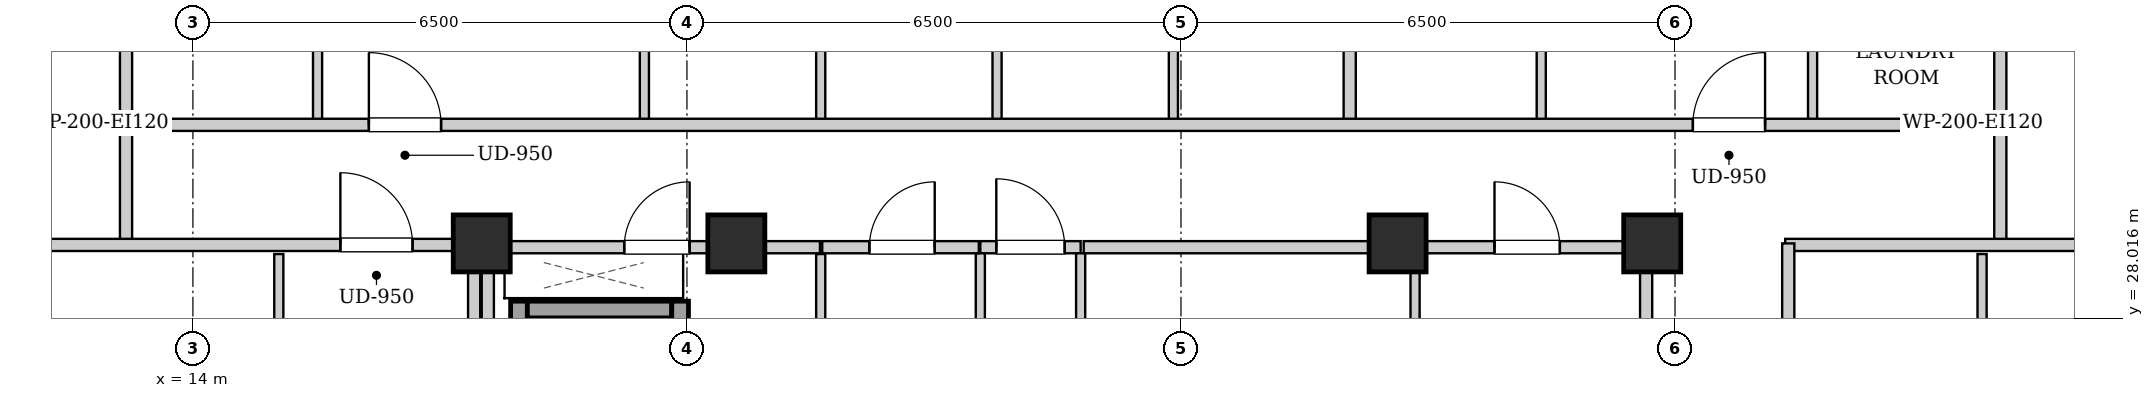
"""IFC4 building model, lengths in metres.
Left out: names, types, materials, properties, quantities, classifications, styles, units other than length and angle.
Written with IfcOpenShell. Run it as: python <this file> out.ifc"""

import sys

from ifc_helpers import new_model, si_unit, direction, frame, frame_2d, origin, origin_2d, place, context, subcontext, project, spatial, rectangle, extrude, element, fill, save


model = new_model("IFC4")
c1 = context("Model", 3, precision=1e-05, world=origin(), true_north=direction((0.0, 1.0)))
c2 = subcontext(c1, "Body", "Model", "MODEL_VIEW")
j1 = project(units=[si_unit("LENGTHUNIT", "METRE"), si_unit("PLANEANGLEUNIT", "RADIAN")], contexts=[c1])
p1 = place(None, origin())
s1 = spatial("IfcSite", under=j1, at=p1, CompositionType="ELEMENT")
p2 = place(p1, origin())
s2 = spatial("IfcBuilding", under=s1, at=p2, CompositionType="ELEMENT")
p3 = place(p2, frame((0.0, 0.0, 247.9)))
s3 = spatial("IfcBuildingStorey", under=s2, at=p3, CompositionType="ELEMENT", Elevation=247.9)
for number, where, z_axis, x_axis in (
    (1, (17.8, 29.0, 0.0), (0.0, 0.0, 1.0), (1.0, 0.0, 0.0)),
    (2, (21.15, 29.0, 0.0), (0.0, 0.0, 1.0), (1.0, 0.0, 0.0)),
    (3, (29.85, 29.0, 0.0), (0.0, 0.0, 1.0), (1.0, 0.0, 0.0)),
    (4, (33.2, 29.0, 0.0), (0.0, 0.0, 1.0), (1.0, 0.0, 0.0)),
):
    element("IfcColumn", number, at=place(p3, frame(where, z_axis=z_axis, x_axis=x_axis)), inside=s3, PredefinedType="COLUMN", context=c2, shape_type="SweptSolid", body=[
        extrude(rectangle(XDim=0.75, YDim=0.75, at=origin_2d()), origin(), (0.0, 0.0, 1.0), 3.4),
    ])
p4 = place(p3, frame((18.29, 24.1, 0.0), z_axis=(0.0, 0.0, 1.0), x_axis=(0.0, 1.0, 0.0)))
e5 = element("IfcWall", 5, at=p4, inside=s3, PredefinedType="SHEAR", context=c2, shape_type="SweptSolid", body=[
    extrude(rectangle(XDim=4.14, YDim=0.22, at=frame_2d((2.07, 0.0))), origin(), (0.0, 0.0, 1.0), 3.14),
])
p5 = place(p3, frame((18.4, 28.13, 0.0), z_axis=(0.0, 0.0, 1.0), x_axis=(1.0, 0.0, 0.0)))
e6 = element("IfcWall", 6, at=p5, inside=s3, PredefinedType="SHEAR", context=c2, shape_type="SweptSolid", body=[
    extrude(rectangle(XDim=1.9, YDim=0.22, at=frame_2d((0.95, 0.0))), origin(), (0.0, 0.0, 1.0), 3.14),
])
p6 = place(p3, frame((20.41, 26.06, 0.0), z_axis=(0.0, 0.0, 1.0), x_axis=(0.0, 1.0, 0.0)))
e7 = element("IfcWall", 7, at=p6, inside=s3, PredefinedType="SHEAR", context=c2, shape_type="SweptSolid", body=[
    extrude(rectangle(XDim=2.18, YDim=0.22, at=frame_2d((1.09, 0.0))), origin(), (0.0, 0.0, 1.0), 3.14),
])
p7 = place(p6, frame((0.54, 0.0, 0.0)))
e8 = element("IfcOpeningElement", 8, at=p7, cuts=e7, PredefinedType="OPENING", context=c2, shape_type="SweptSolid", body=[
    extrude(rectangle(XDim=1.1, YDim=2.15, at=frame_2d((0.55, 1.075))), frame((0.0, 0.12, 0.0), z_axis=(0.0, -1.0, 0.0), x_axis=(1.0, 0.0, 0.0)), (0.0, 0.0, 1.0), 0.24),
])
for number, where, z_axis, x_axis in (
    (9, (17.88, 24.12, 0.0), (0.0, 0.0, 1.0), (0.0, 1.0, 0.0)),
    (10, (33.12, 24.12, 0.0), (0.0, 0.0, 1.0), (0.0, 1.0, 0.0)),
):
    element("IfcWall", number, at=place(p3, frame(where, z_axis=z_axis, x_axis=x_axis)), inside=s3, PredefinedType="PARTITIONING", context=c2, shape_type="SweptSolid", body=[
        extrude(rectangle(XDim=4.76, YDim=0.16, at=frame_2d((2.38, 0.0))), origin(), (0.0, 0.0, 1.0), 2.475),
    ])
p8 = place(p3, frame((24.36, 28.95, 0.0), z_axis=(0.0, 0.0, 1.0), x_axis=(1.0, 0.0, 0.0)))
e11 = element("IfcWall", 11, at=p8, inside=s3, PredefinedType="PARTITIONING", context=c2, shape_type="SweptSolid", body=[
    extrude(rectangle(XDim=1.32, YDim=0.16, at=frame_2d((0.66, 0.0))), origin(), (0.0, 0.0, 1.0), 2.668),
])
p9 = place(p8, frame((0.21, 0.0, 0.0)))
e12 = element("IfcOpeningElement", 12, at=p9, cuts=e11, PredefinedType="OPENING", context=c2, shape_type="SweptSolid", body=[
    extrude(rectangle(XDim=0.9, YDim=2.05, at=frame_2d((0.45, 1.025))), frame((0.0, 0.09, 0.0), z_axis=(0.0, -1.0, 0.0), x_axis=(1.0, 0.0, 0.0)), (0.0, 0.0, 1.0), 0.18),
])
p10 = place(p3, frame((17.96, 28.95, 0.0), z_axis=(0.0, 0.0, 1.0), x_axis=(1.0, 0.0, 0.0)))
e13 = element("IfcWall", 13, at=p10, inside=s3, PredefinedType="PARTITIONING", context=c2, shape_type="SweptSolid", body=[
    extrude(rectangle(XDim=4.29, YDim=0.16, at=frame_2d((2.145, 0.0))), origin(), (0.0, 0.0, 1.0), 2.668),
])
p11 = place(p10, frame((1.715, 0.0, 0.0)))
e14 = element("IfcOpeningElement", 14, at=p11, cuts=e13, PredefinedType="OPENING", context=c2, shape_type="SweptSolid", body=[
    extrude(rectangle(XDim=0.86, YDim=2.05, at=frame_2d((0.43, 1.025))), frame((0.0, 0.09, 0.0), z_axis=(0.0, -1.0, 0.0), x_axis=(1.0, 0.0, 0.0)), (0.0, 0.0, 1.0), 0.18),
])
for number, where, z_axis, x_axis in (
    (15, (24.36, 25.0, 0.0), (0.0, 0.0, 1.0), (0.0, 1.0, 0.0)),
    (16, (25.68, 25.0, 0.0), (0.0, 0.0, 1.0), (0.0, 1.0, 0.0)),
):
    element("IfcWall", number, at=place(p3, frame(where, z_axis=z_axis, x_axis=x_axis)), inside=s3, PredefinedType="PARTITIONING", context=c2, shape_type="SweptSolid", body=[
        extrude(rectangle(XDim=3.87, YDim=0.12, at=frame_2d((1.935, 0.0))), origin(), (0.0, 0.0, 1.0), 3.14),
    ])
p12 = place(p3, frame((30.08, 26.18, 0.0), z_axis=(0.0, 0.0, 1.0), x_axis=(0.0, 1.0, 0.0)))
e17 = element("IfcWall", 17, at=p12, inside=s3, PredefinedType="PARTITIONING", context=c2, shape_type="SweptSolid", body=[
    extrude(rectangle(XDim=2.68, YDim=0.12, at=frame_2d((1.34, 0.0))), origin(), (0.0, 0.0, 1.0), 3.14),
])
p13 = place(p3, frame((30.08, 28.95, 0.0), z_axis=(0.0, 0.0, 1.0), x_axis=(1.0, 0.0, 0.0)))
e18 = element("IfcWall", 18, at=p13, inside=s3, PredefinedType="PARTITIONING", context=c2, shape_type="SweptSolid", body=[
    extrude(rectangle(XDim=2.96, YDim=0.16, at=frame_2d((1.48, 0.0))), origin(), (0.0, 0.0, 1.0), 3.14),
])
p14 = place(p13, frame((1.045, 0.0, 0.0)))
e19 = element("IfcOpeningElement", 19, at=p14, cuts=e18, PredefinedType="OPENING", context=c2, shape_type="SweptSolid", body=[
    extrude(rectangle(XDim=0.86, YDim=2.05, at=frame_2d((0.43, 1.025))), frame((0.0, 0.09, 0.0), z_axis=(0.0, -1.0, 0.0), x_axis=(1.0, 0.0, 0.0)), (0.0, 0.0, 1.0), 0.18),
])
p15 = place(p3, frame((22.26, 25.0, 0.0), z_axis=(0.0, 0.0, 1.0), x_axis=(0.0, 1.0, 0.0)))
e20 = element("IfcWall", 20, at=p15, inside=s3, PredefinedType="PARTITIONING", context=c2, shape_type="SweptSolid", body=[
    extrude(rectangle(XDim=3.86, YDim=0.12, at=frame_2d((1.93, 0.0))), origin(), (0.0, 0.0, 1.0), 3.14),
])
p16 = place(p3, frame((22.28, 28.95, 0.0), z_axis=(0.0, 0.0, 1.0), x_axis=(1.0, 0.0, 0.0)))
e21 = element("IfcWall", 21, at=p16, inside=s3, PredefinedType="PARTITIONING", context=c2, shape_type="SweptSolid", body=[
    extrude(rectangle(XDim=2.06, YDim=0.16, at=frame_2d((1.03, 0.0))), origin(), (0.0, 0.0, 1.0), 2.668),
])
p17 = place(p16, frame((0.62, 0.0, 0.0)))
e22 = element("IfcOpeningElement", 22, at=p17, cuts=e21, PredefinedType="OPENING", context=c2, shape_type="SweptSolid", body=[
    extrude(rectangle(XDim=0.86, YDim=2.05, at=frame_2d((0.43, 1.025))), frame((0.0, 0.09, 0.0), z_axis=(0.0, -1.0, 0.0), x_axis=(1.0, 0.0, 0.0)), (0.0, 0.0, 1.0), 0.18),
])
p18 = place(p3, frame((25.72, 28.95, 0.0), z_axis=(0.0, 0.0, 1.0), x_axis=(1.0, 0.0, 0.0)))
e23 = element("IfcWall", 23, at=p18, inside=s3, PredefinedType="PARTITIONING", context=c2, shape_type="SweptSolid", body=[
    extrude(rectangle(XDim=4.32, YDim=0.16, at=frame_2d((2.16, 0.0))), origin(), (0.0, 0.0, 1.0), 2.668),
])
for number, where, z_axis, x_axis in (
    (24, (13.12, 28.98, 0.0), (0.0, 0.0, 1.0), (0.0, 1.0, 0.0)),
    (25, (37.78, 28.98, 0.0), (0.0, 0.0, 1.0), (0.0, 1.0, 0.0)),
):
    element("IfcWall", number, at=place(p3, frame(where, z_axis=z_axis, x_axis=x_axis)), inside=s3, PredefinedType="PARTITIONING", context=c2, shape_type="SweptSolid", body=[
        extrude(rectangle(XDim=1.58, YDim=0.16, at=frame_2d((0.79, 0.0))), origin(), (0.0, 0.0, 1.0), 3.14),
    ])
p19 = place(p3, frame((34.95, 28.98, 0.0), z_axis=(0.0, 0.0, 1.0), x_axis=(1.0, 0.0, 0.0)))
e26 = element("IfcWall", 26, at=p19, inside=s3, PredefinedType="PARTITIONING", context=c2, shape_type="SweptSolid", body=[
    extrude(rectangle(XDim=5.07, YDim=0.16, at=frame_2d((2.535, 0.0))), origin(), (0.0, 0.0, 1.0), 2.668),
])
p20 = place(p3, frame((13.12, 30.6, 0.0), z_axis=(0.0, 0.0, 1.0), x_axis=(0.0, 1.0, 0.0)))
e27 = element("IfcWall", 27, at=p20, inside=s3, PredefinedType="PARTITIONING", context=c2, shape_type="SweptSolid", body=[
    extrude(rectangle(XDim=2.91, YDim=0.16, at=frame_2d((1.455, 0.0))), origin(), (0.0, 0.0, 1.0), 3.14),
])
p21 = place(p3, frame((15.64, 30.6, 0.0), z_axis=(0.0, 0.0, 1.0), x_axis=(0.0, 1.0, 0.0)))
e28 = element("IfcWall", 28, at=p21, inside=s3, PredefinedType="PARTITIONING", context=c2, shape_type="SweptSolid", body=[
    extrude(rectangle(XDim=2.85, YDim=0.12, at=frame_2d((1.425, 0.0))), origin(), (0.0, 0.0, 1.0), 3.14),
])
p22 = place(p21, frame((0.995, 0.0, 0.0)))
e29 = element("IfcOpeningElement", 29, at=p22, cuts=e28, PredefinedType="OPENING", context=c2, shape_type="SweptSolid", body=[
    extrude(rectangle(XDim=0.86, YDim=2.05, at=frame_2d((0.43, 1.025))), frame((0.0, 0.07, 0.0), z_axis=(0.0, -1.0, 0.0), x_axis=(1.0, 0.0, 0.0)), (0.0, 0.0, 1.0), 0.14),
])
p23 = place(p3, frame((19.94, 30.6, 0.0), z_axis=(0.0, 0.0, 1.0), x_axis=(0.0, 1.0, 0.0)))
e30 = element("IfcWall", 30, at=p23, inside=s3, PredefinedType="PARTITIONING", context=c2, shape_type="SweptSolid", body=[
    extrude(rectangle(XDim=2.85, YDim=0.12, at=frame_2d((1.425, 0.0))), origin(), (0.0, 0.0, 1.0), 3.14),
])
p24 = place(p23, frame((0.975, 0.0, 0.0)))
e31 = element("IfcOpeningElement", 31, at=p24, cuts=e30, PredefinedType="OPENING", context=c2, shape_type="SweptSolid", body=[
    extrude(rectangle(XDim=0.9, YDim=2.05, at=frame_2d((0.45, 1.025))), frame((0.0, 0.07, 0.0), z_axis=(0.0, -1.0, 0.0), x_axis=(1.0, 0.0, 0.0)), (0.0, 0.0, 1.0), 0.14),
])
p25 = place(p3, frame((22.26, 30.6, 0.0), z_axis=(0.0, 0.0, 1.0), x_axis=(0.0, 1.0, 0.0)))
e32 = element("IfcWall", 32, at=p25, inside=s3, PredefinedType="PARTITIONING", context=c2, shape_type="SweptSolid", body=[
    extrude(rectangle(XDim=2.85, YDim=0.12, at=frame_2d((1.425, 0.0))), origin(), (0.0, 0.0, 1.0), 3.14),
])
p26 = place(p25, frame((0.975, 0.0, 0.0)))
e33 = element("IfcOpeningElement", 33, at=p26, cuts=e32, PredefinedType="OPENING", context=c2, shape_type="SweptSolid", body=[
    extrude(rectangle(XDim=0.9, YDim=2.05, at=frame_2d((0.45, 1.025))), frame((0.0, 0.07, 0.0), z_axis=(0.0, -1.0, 0.0), x_axis=(1.0, 0.0, 0.0)), (0.0, 0.0, 1.0), 0.14),
])
p27 = place(p3, frame((24.58, 30.6, 0.0), z_axis=(0.0, 0.0, 1.0), x_axis=(0.0, 1.0, 0.0)))
e34 = element("IfcWall", 34, at=p27, inside=s3, PredefinedType="PARTITIONING", context=c2, shape_type="SweptSolid", body=[
    extrude(rectangle(XDim=2.85, YDim=0.12, at=frame_2d((1.425, 0.0))), origin(), (0.0, 0.0, 1.0), 3.14),
])
p28 = place(p27, frame((0.975, 0.0, 0.0)))
e35 = element("IfcOpeningElement", 35, at=p28, cuts=e34, PredefinedType="OPENING", context=c2, shape_type="SweptSolid", body=[
    extrude(rectangle(XDim=0.9, YDim=2.05, at=frame_2d((0.45, 1.025))), frame((0.0, 0.07, 0.0), z_axis=(0.0, -1.0, 0.0), x_axis=(1.0, 0.0, 0.0)), (0.0, 0.0, 1.0), 0.14),
])
p29 = place(p3, frame((26.9, 30.6, 0.0), z_axis=(0.0, 0.0, 1.0), x_axis=(0.0, 1.0, 0.0)))
e36 = element("IfcWall", 36, at=p29, inside=s3, PredefinedType="PARTITIONING", context=c2, shape_type="SweptSolid", body=[
    extrude(rectangle(XDim=2.85, YDim=0.12, at=frame_2d((1.425, 0.0))), origin(), (0.0, 0.0, 1.0), 3.14),
])
p30 = place(p29, frame((0.975, 0.0, 0.0)))
e37 = element("IfcOpeningElement", 37, at=p30, cuts=e36, PredefinedType="OPENING", context=c2, shape_type="SweptSolid", body=[
    extrude(rectangle(XDim=0.9, YDim=2.05, at=frame_2d((0.45, 1.025))), frame((0.0, 0.07, 0.0), z_axis=(0.0, -1.0, 0.0), x_axis=(1.0, 0.0, 0.0)), (0.0, 0.0, 1.0), 0.14),
])
p31 = place(p3, frame((37.78, 30.6, 0.0), z_axis=(0.0, 0.0, 1.0), x_axis=(0.0, 1.0, 0.0)))
e38 = element("IfcWall", 38, at=p31, inside=s3, PredefinedType="PARTITIONING", context=c2, shape_type="SweptSolid", body=[
    extrude(rectangle(XDim=2.91, YDim=0.16, at=frame_2d((1.455, 0.0))), origin(), (0.0, 0.0, 1.0), 3.14),
])
p32 = place(p3, frame((29.22, 30.6, 0.0), z_axis=(0.0, 0.0, 1.0), x_axis=(0.0, 1.0, 0.0)))
e39 = element("IfcWall", 39, at=p32, inside=s3, PredefinedType="PARTITIONING", context=c2, shape_type="SweptSolid", body=[
    extrude(rectangle(XDim=9.32, YDim=0.16, at=frame_2d((4.66, 0.0))), origin(), (0.0, 0.0, 1.0), 3.14),
])
p33 = place(p3, frame((31.74, 30.6, 0.0), z_axis=(0.0, 0.0, 1.0), x_axis=(0.0, 1.0, 0.0)))
e40 = element("IfcWall", 40, at=p33, inside=s3, PredefinedType="PARTITIONING", context=c2, shape_type="SweptSolid", body=[
    extrude(rectangle(XDim=2.85, YDim=0.12, at=frame_2d((1.425, 0.0))), origin(), (0.0, 0.0, 1.0), 3.14),
])
p34 = place(p33, frame((0.995, 0.0, 0.0)))
e41 = element("IfcOpeningElement", 41, at=p34, cuts=e40, PredefinedType="OPENING", context=c2, shape_type="SweptSolid", body=[
    extrude(rectangle(XDim=0.86, YDim=2.05, at=frame_2d((0.43, 1.025))), frame((0.0, 0.07, 0.0), z_axis=(0.0, -1.0, 0.0), x_axis=(1.0, 0.0, 0.0)), (0.0, 0.0, 1.0), 0.14),
])
p35 = place(p3, frame((35.31, 30.6, 0.0), z_axis=(0.0, 0.0, 1.0), x_axis=(0.0, 1.0, 0.0)))
e42 = element("IfcWall", 42, at=p35, inside=s3, PredefinedType="PARTITIONING", context=c2, shape_type="SweptSolid", body=[
    extrude(rectangle(XDim=2.85, YDim=0.12, at=frame_2d((1.425, 0.0))), origin(), (0.0, 0.0, 1.0), 3.14),
])
p36 = place(p35, frame((0.975, 0.0, 0.0)))
e43 = element("IfcOpeningElement", 43, at=p36, cuts=e42, PredefinedType="OPENING", context=c2, shape_type="SweptSolid", body=[
    extrude(rectangle(XDim=0.9, YDim=2.05, at=frame_2d((0.45, 1.025))), frame((0.0, 0.07, 0.0), z_axis=(0.0, -1.0, 0.0), x_axis=(1.0, 0.0, 0.0)), (0.0, 0.0, 1.0), 0.14),
])
p37 = place(p3, frame((10.88, 28.98, 0.0), z_axis=(0.0, 0.0, 1.0), x_axis=(1.0, 0.0, 0.0)))
e44 = element("IfcWall", 44, at=p37, inside=s3, PredefinedType="PARTITIONING", context=c2, shape_type="SweptSolid", body=[
    extrude(rectangle(XDim=6.88, YDim=0.16, at=frame_2d((3.44, 0.0))), origin(), (0.0, 0.0, 1.0), 2.668),
])
p38 = place(p37, frame((5.06, 0.0, 0.0)))
e45 = element("IfcOpeningElement", 45, at=p38, cuts=e44, PredefinedType="OPENING", context=c2, shape_type="SweptSolid", body=[
    extrude(rectangle(XDim=0.95, YDim=2.1, at=frame_2d((0.475, 1.05))), frame((0.0, 0.09, 0.0), z_axis=(0.0, -1.0, 0.0), x_axis=(1.0, 0.0, 0.0)), (0.0, 0.0, 1.0), 0.18),
])
p39 = place(p3, frame((15.13, 25.052, 0.0), z_axis=(0.0, 0.0, 1.0), x_axis=(0.0, 1.0, 0.0)))
e46 = element("IfcWall", 46, at=p39, inside=s3, PredefinedType="PARTITIONING", context=c2, shape_type="SweptSolid", body=[
    extrude(rectangle(XDim=3.808, YDim=0.12, at=frame_2d((1.904, 0.0))), origin(), (0.0, 0.0, 1.0), 3.14),
])
p40 = place(p39, frame((1.454, 0.0, 0.0)))
e47 = element("IfcOpeningElement", 47, at=p40, cuts=e46, PredefinedType="OPENING", context=c2, shape_type="SweptSolid", body=[
    extrude(rectangle(XDim=0.9, YDim=2.05, at=frame_2d((0.45, 1.025))), frame((0.0, 0.07, 0.0), z_axis=(0.0, -1.0, 0.0), x_axis=(1.0, 0.0, 0.0)), (0.0, 0.0, 1.0), 0.14),
])
p41 = place(p3, frame((37.54, 24.552, 0.0), z_axis=(0.0, 0.0, 1.0), x_axis=(0.0, 1.0, 0.0)))
e48 = element("IfcWall", 48, at=p41, inside=s3, PredefinedType="PARTITIONING", context=c2, shape_type="SweptSolid", body=[
    extrude(rectangle(XDim=4.308, YDim=0.12, at=frame_2d((2.154, 0.0))), origin(), (0.0, 0.0, 1.0), 3.14),
])
p42 = place(p41, frame((1.704, 0.0, 0.0)))
e49 = element("IfcOpeningElement", 49, at=p42, cuts=e48, PredefinedType="OPENING", context=c2, shape_type="SweptSolid", body=[
    extrude(rectangle(XDim=0.9, YDim=2.05, at=frame_2d((0.45, 1.025))), frame((0.0, 0.07, 0.0), z_axis=(0.0, -1.0, 0.0), x_axis=(1.0, 0.0, 0.0)), (0.0, 0.0, 1.0), 0.14),
])
p43 = place(p3, frame((13.15, 30.56, 0.0), z_axis=(0.0, 0.0, 1.0), x_axis=(1.0, 0.0, 0.0)))
e50 = element("IfcWall", 50, at=p43, inside=s3, PredefinedType="PARTITIONING", context=c2, shape_type="SweptSolid", body=[
    extrude(rectangle(XDim=24.6, YDim=0.16, at=frame_2d((12.3, 0.0))), origin(), (0.0, 0.0, 1.0), 3.14),
])
p44 = place(p43, frame((3.165, 0.0, 0.0)))
e51 = element("IfcOpeningElement", 51, at=p44, cuts=e50, PredefinedType="OPENING", context=c2, shape_type="SweptSolid", body=[
    extrude(rectangle(XDim=0.95, YDim=2.1, at=frame_2d((0.475, 1.05))), frame((0.0, 0.09, 0.0), z_axis=(0.0, -1.0, 0.0), x_axis=(1.0, 0.0, 0.0)), (0.0, 0.0, 1.0), 0.18),
])
p45 = place(p43, frame((20.585, 0.0, 0.0)))
e52 = element("IfcOpeningElement", 52, at=p45, cuts=e50, PredefinedType="OPENING", context=c2, shape_type="SweptSolid", body=[
    extrude(rectangle(XDim=0.95, YDim=2.1, at=frame_2d((0.475, 1.05))), frame((0.0, 0.09, 0.0), z_axis=(0.0, -1.0, 0.0), x_axis=(1.0, 0.0, 0.0)), (0.0, 0.0, 1.0), 0.18),
])
p46 = place(p3, frame((17.7, 15.02, 0.0), z_axis=(0.0, 0.0, 1.0), x_axis=(0.0, 1.0, 0.0)))
e53 = element("IfcWall", 53, at=p46, inside=s3, PredefinedType="PARTITIONING", context=c2, shape_type="SweptSolid", body=[
    extrude(rectangle(XDim=13.98, YDim=0.16, at=frame_2d((6.99, 0.0))), origin(), (0.0, 0.0, 1.0), 2.475),
])
p47 = place(p3, frame((34.99, 15.07, 0.0), z_axis=(0.0, 0.0, 1.0), x_axis=(0.0, 1.0, 0.0)))
e54 = element("IfcWall", 54, at=p47, inside=s3, PredefinedType="PARTITIONING", context=c2, shape_type="SweptSolid", body=[
    extrude(rectangle(XDim=13.93, YDim=0.16, at=frame_2d((6.965, 0.0))), origin(), (0.0, 0.0, 1.0), 3.14),
])
p48 = place(p47, frame((4.385, 0.0, 0.0)))
e55 = element("IfcOpeningElement", 55, at=p48, cuts=e54, PredefinedType="OPENING", context=c2, shape_type="SweptSolid", body=[
    extrude(rectangle(XDim=0.95, YDim=2.1, at=frame_2d((0.475, 1.05))), frame((0.0, 0.09, 0.0), z_axis=(0.0, -1.0, 0.0), x_axis=(1.0, 0.0, 0.0)), (0.0, 0.0, 1.0), 0.18),
])
p49 = place(p9, origin())
e56 = element("IfcDoor", 56, at=p49, inside=s3, OperationType="SINGLE_SWING_LEFT", PredefinedType="DOOR", context=c2, shape_type="SweptSolid", body=[
    extrude(rectangle(XDim=0.9, YDim=2.05, at=frame_2d((0.45, 1.025))), frame((0.0, 0.025, 0.0), z_axis=(0.0, -1.0, 0.0), x_axis=(1.0, 0.0, 0.0)), (0.0, 0.0, 1.0), 0.05),
])
fill(e12, e56)
p50 = place(p11, origin())
e57 = element("IfcDoor", 57, at=p50, inside=s3, OperationType="SINGLE_SWING_RIGHT", PredefinedType="DOOR", context=c2, shape_type="SweptSolid", body=[
    extrude(rectangle(XDim=0.86, YDim=2.05, at=frame_2d((0.43, 1.025))), frame((0.0, 0.025, 0.0), z_axis=(0.0, -1.0, 0.0), x_axis=(1.0, 0.0, 0.0)), (0.0, 0.0, 1.0), 0.05),
])
fill(e14, e57)
p51 = place(p14, origin())
e58 = element("IfcDoor", 58, at=p51, inside=s3, OperationType="SINGLE_SWING_LEFT", PredefinedType="DOOR", context=c2, shape_type="SweptSolid", body=[
    extrude(rectangle(XDim=0.86, YDim=2.05, at=frame_2d((0.43, 1.025))), frame((0.0, 0.025, 0.0), z_axis=(0.0, -1.0, 0.0), x_axis=(1.0, 0.0, 0.0)), (0.0, 0.0, 1.0), 0.05),
])
fill(e19, e58)
p52 = place(p17, origin())
e59 = element("IfcDoor", 59, at=p52, inside=s3, OperationType="SINGLE_SWING_RIGHT", PredefinedType="DOOR", context=c2, shape_type="SweptSolid", body=[
    extrude(rectangle(XDim=0.86, YDim=2.05, at=frame_2d((0.43, 1.025))), frame((0.0, 0.025, 0.0), z_axis=(0.0, -1.0, 0.0), x_axis=(1.0, 0.0, 0.0)), (0.0, 0.0, 1.0), 0.05),
])
fill(e22, e59)
p53 = place(p38, origin())
e60 = element("IfcDoor", 60, at=p53, inside=s3, OperationType="SINGLE_SWING_LEFT", PredefinedType="DOOR", context=c2, shape_type="SweptSolid", body=[
    extrude(rectangle(XDim=0.95, YDim=2.1, at=frame_2d((0.475, 1.05))), frame((0.0, 0.025, 0.0), z_axis=(0.0, -1.0, 0.0), x_axis=(1.0, 0.0, 0.0)), (0.0, 0.0, 1.0), 0.05),
])
fill(e45, e60)
p54 = place(p44, origin())
e61 = element("IfcDoor", 61, at=p54, inside=s3, OperationType="SINGLE_SWING_LEFT", PredefinedType="DOOR", context=c2, shape_type="SweptSolid", body=[
    extrude(rectangle(XDim=0.95, YDim=2.1, at=frame_2d((0.475, 1.05))), frame((0.0, 0.025, 0.0), z_axis=(0.0, -1.0, 0.0), x_axis=(1.0, 0.0, 0.0)), (0.0, 0.0, 1.0), 0.05),
])
fill(e51, e61)
p55 = place(p45, origin())
e62 = element("IfcDoor", 62, at=p55, inside=s3, OperationType="SINGLE_SWING_RIGHT", PredefinedType="DOOR", context=c2, shape_type="SweptSolid", body=[
    extrude(rectangle(XDim=0.95, YDim=2.1, at=frame_2d((0.475, 1.05))), frame((0.0, 0.025, 0.0), z_axis=(0.0, -1.0, 0.0), x_axis=(1.0, 0.0, 0.0)), (0.0, 0.0, 1.0), 0.05),
])
fill(e52, e62)
save(model, sys.argv[1])
